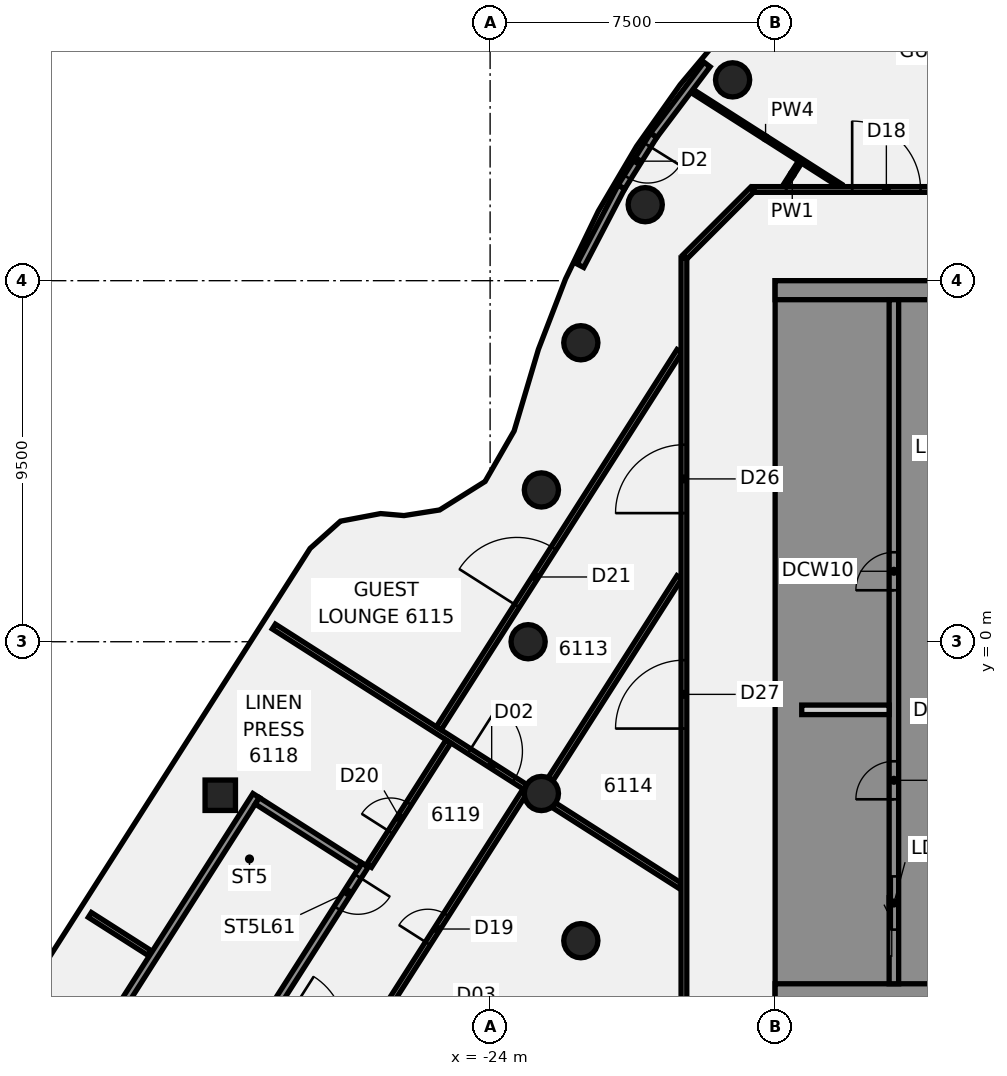
"""IFC4 building model, lengths in metres.
Left out: names, types, materials, properties, quantities, classifications, styles, units other than length and angle.
Written with IfcOpenShell. Run it as: python <this file> out.ifc"""

import sys

from ifc_helpers import new_model, si_unit, direction, frame, frame_2d, origin, origin_2d, place, context, subcontext, project, spatial, polyline, rectangle, circle, outline, extrude, element, fill, save


model = new_model("IFC4")
c1 = context("Model", 3, precision=1e-05, world=origin(), true_north=direction((0.0, 1.0)))
c2 = subcontext(c1, "Body", "Model", "MODEL_VIEW")
j1 = project(units=[si_unit("LENGTHUNIT", "METRE"), si_unit("PLANEANGLEUNIT", "RADIAN")], contexts=[c1])
p1 = place(None, origin())
s1 = spatial("IfcSite", under=j1, at=p1, CompositionType="ELEMENT")
p2 = place(p1, origin())
s2 = spatial("IfcBuilding", under=s1, at=p2, CompositionType="ELEMENT")
p3 = place(p2, frame((0.0, 0.0, 241.5)))
s3 = spatial("IfcBuildingStorey", under=s2, at=p3, CompositionType="ELEMENT", Elevation=241.5)
for number, where, z_axis, x_axis in (
    (1, (-17.619, 14.784, -0.14), (0.0, 0.0, 1.0), (1.0, 0.0, 0.0)),
    (2, (-19.919, 11.5, -0.14), (0.0, 0.0, 1.0), (1.0, 0.0, 0.0)),
    (3, (-21.613, 7.866, -0.14), (0.0, 0.0, 1.0), (1.0, 0.0, 0.0)),
    (4, (-22.651, 3.994, -0.14), (0.0, 0.0, 1.0), (1.0, 0.0, 0.0)),
    (5, (-23.0, 0.0, -0.14), (0.0, 0.0, 1.0), (1.0, 0.0, 0.0)),
    (6, (-22.651, -3.994, -0.14), (0.0, 0.0, 1.0), (1.0, 0.0, 0.0)),
    (7, (-21.613, -7.866, -0.14), (0.0, 0.0, 1.0), (1.0, 0.0, 0.0)),
):
    element("IfcColumn", number, at=place(p3, frame(where, z_axis=z_axis, x_axis=x_axis)), inside=s3, PredefinedType="COLUMN", context=c2, shape_type="SweptSolid", body=[
        extrude(circle(Radius=0.45, at=origin_2d()), origin(), (0.0, 0.0, 1.0), 3.6),
    ])
p4 = place(p3, frame((-31.101, -4.039, -0.139), z_axis=(0.020876035086, -0.045886609589, 0.998728496749), x_axis=(0.538011031714, 0.842490323988, 0.027462405943)))
e8 = element("IfcColumn", 8, at=p4, inside=s3, PredefinedType="COLUMN", context=c2, shape_type="SweptSolid", body=[
    extrude(rectangle(XDim=0.8, YDim=0.8, at=origin_2d()), origin(), (0.0, 0.0, 1.0), 3.602),
])
p5 = place(p3, frame((-34.532, -7.189, 0.0), z_axis=(0.0, 0.0, 1.0), x_axis=(0.84321231402, -0.537580685558, 0.0)))
e9 = element("IfcWall", 9, at=p5, inside=s3, PredefinedType="PARTITIONING", context=c2, shape_type="SweptSolid", body=[
    extrude(rectangle(XDim=1.859, YDim=0.15, at=frame_2d((0.929, 0.0))), origin(), (0.0, 0.0, 1.0), 2.864),
])
p6 = place(p3, frame((-29.691, 0.399, 0.0), z_axis=(0.0, 0.0, 1.0), x_axis=(0.843069969202, -0.537803892724, 0.0)))
e10 = element("IfcWall", 10, at=p6, inside=s3, PredefinedType="PARTITIONING", context=c2, shape_type="SweptSolid", body=[
    extrude(rectangle(XDim=7.858, YDim=0.15, at=frame_2d((3.929, 0.0))), origin(), (0.0, 0.0, 1.0), 2.864),
])
p7 = place(p6, frame((6.099, 0.0, 0.0)))
e11 = element("IfcOpeningElement", 11, at=p7, cuts=e10, PredefinedType="OPENING", context=c2, shape_type="SweptSolid", body=[
    extrude(rectangle(XDim=1.4, YDim=2.1, at=frame_2d((0.7, 1.05))), frame((0.0, 0.085, 0.0), z_axis=(0.0, -1.0, 0.0), x_axis=(1.0, 0.0, 0.0)), (0.0, 0.0, 1.0), 0.17),
])
p8 = place(p3, frame((-22.327, -4.298, 0.0), z_axis=(0.0, 0.0, 1.0), x_axis=(0.843073070403, -0.537799031201, 0.0)))
e12 = element("IfcWall", 12, at=p8, inside=s3, PredefinedType="PARTITIONING", context=c2, shape_type="SweptSolid", body=[
    extrude(rectangle(XDim=3.95, YDim=0.15, at=frame_2d((1.975, 0.0))), origin(), (0.0, 0.0, 1.0), 2.864),
])
p9 = place(p3, frame((-18.724, 14.517, 0.0), z_axis=(0.0, 0.0, 1.0), x_axis=(0.843037970222, -0.537854051546, 0.0)))
e13 = element("IfcWall", 13, at=p9, inside=s3, PredefinedType="PARTITIONING", context=c2, shape_type="SweptSolid", body=[
    extrude(rectangle(XDim=4.68, YDim=0.1, at=frame_2d((2.34, 0.0))), origin(), (0.0, 0.0, 1.0), 2.864),
])
p10 = place(p3, frame((-17.065, 11.9, 0.0), z_axis=(0.0, 0.0, 1.0), x_axis=(1.0, 0.0, 0.0)))
e14 = element("IfcWall", 14, at=p10, inside=s3, PredefinedType="PARTITIONING", context=c2, shape_type="SweptSolid", body=[
    extrude(rectangle(XDim=34.165, YDim=0.15, at=frame_2d((17.083, 0.0))), origin(), (0.0, 0.0, 1.0), 2.864),
])
p11 = place(p10, frame((24.944, 0.0, 0.0)))
e15 = element("IfcOpeningElement", 15, at=p11, cuts=e14, PredefinedType="OPENING", context=c2, shape_type="SweptSolid", body=[
    extrude(rectangle(XDim=1.8, YDim=2.1, at=frame_2d((0.9, 1.05))), frame((0.0, 0.085, 0.0), z_axis=(0.0, -1.0, 0.0), x_axis=(1.0, 0.0, 0.0)), (0.0, 0.0, 1.0), 0.17),
])
p12 = place(p10, frame((9.642, 0.0, 0.0)))
e16 = element("IfcOpeningElement", 16, at=p12, cuts=e14, PredefinedType="OPENING", context=c2, shape_type="SweptSolid", body=[
    extrude(rectangle(XDim=1.8, YDim=2.1, at=frame_2d((0.9, 1.05))), frame((0.0, 0.085, 0.0), z_axis=(0.0, -1.0, 0.0), x_axis=(1.0, 0.0, 0.0)), (0.0, 0.0, 1.0), 0.17),
])
p13 = place(p10, frame((2.592, 0.0, 0.0)))
e17 = element("IfcOpeningElement", 17, at=p13, cuts=e14, PredefinedType="OPENING", context=c2, shape_type="SweptSolid", body=[
    extrude(rectangle(XDim=1.8, YDim=2.1, at=frame_2d((0.9, 1.05))), frame((0.0, 0.085, 0.0), z_axis=(0.0, -1.0, 0.0), x_axis=(1.0, 0.0, 0.0)), (0.0, 0.0, 1.0), 0.17),
])
p14 = place(p3, frame((-18.872, 10.128, 0.0), z_axis=(0.0, 0.0, 1.0), x_axis=(0.707106781187, 0.707106781187, 0.0)))
e18 = element("IfcWall", 18, at=p14, inside=s3, PredefinedType="PARTITIONING", context=c2, shape_type="SweptSolid", body=[
    extrude(rectangle(XDim=2.505, YDim=0.15, at=frame_2d((1.253, 0.0))), origin(), (0.0, 0.0, 1.0), 2.864),
])
p15 = place(p3, frame((-27.83, -11.369, 0.0), z_axis=(0.0, 0.0, 1.0), x_axis=(0.53821322343, 0.842808712654, 0.0)))
e19 = element("IfcWall", 19, at=p15, inside=s3, PredefinedType="PARTITIONING", context=c2, shape_type="SweptSolid", body=[
    extrude(rectangle(XDim=8.781, YDim=0.15, at=frame_2d((4.391, 0.0))), origin(), (0.0, 0.0, 1.0), 2.864),
])
p16 = place(p15, frame((4.07, 0.0, 0.0)))
e20 = element("IfcOpeningElement", 20, at=p16, cuts=e19, PredefinedType="OPENING", context=c2, shape_type="SweptSolid", body=[
    extrude(rectangle(XDim=0.9, YDim=2.1, at=frame_2d((0.45, 1.05))), frame((0.0, 0.085, 0.0), z_axis=(0.0, -1.0, 0.0), x_axis=(1.0, 0.0, 0.0)), (0.0, 0.0, 1.0), 0.17),
])
p17 = place(p3, frame((-27.185, -5.896, 0.0), z_axis=(0.0, 0.0, 1.0), x_axis=(0.537860416346, 0.843033909477, 0.0)))
e21 = element("IfcWall", 21, at=p17, inside=s3, PredefinedType="PARTITIONING", context=c2, shape_type="SweptSolid", body=[
    extrude(rectangle(XDim=3.88, YDim=0.15, at=frame_2d((1.94, 0.0))), origin(), (0.0, 0.0, 1.0), 2.864),
])
p18 = place(p17, frame((1.05, 0.0, 0.0)))
e22 = element("IfcOpeningElement", 22, at=p18, cuts=e21, PredefinedType="OPENING", context=c2, shape_type="SweptSolid", body=[
    extrude(rectangle(XDim=0.9, YDim=2.1, at=frame_2d((0.45, 1.05))), frame((0.0, 0.085, 0.0), z_axis=(0.0, -1.0, 0.0), x_axis=(1.0, 0.0, 0.0)), (0.0, 0.0, 1.0), 0.17),
])
p19 = place(p3, frame((-25.35, -2.276, 0.0), z_axis=(0.0, 0.0, 1.0), x_axis=(0.537870843286, 0.84302725694, 0.0)))
e23 = element("IfcWall", 23, at=p19, inside=s3, PredefinedType="PARTITIONING", context=c2, shape_type="SweptSolid", body=[
    extrude(rectangle(XDim=11.772, YDim=0.15, at=frame_2d((5.886, 0.0))), origin(), (0.0, 0.0, 1.0), 2.864),
])
p20 = place(p19, frame((3.82, 0.0, 0.0)))
e24 = element("IfcOpeningElement", 24, at=p20, cuts=e23, PredefinedType="OPENING", context=c2, shape_type="SweptSolid", body=[
    extrude(rectangle(XDim=1.8, YDim=2.1, at=frame_2d((0.9, 1.05))), frame((0.0, 0.085, 0.0), z_axis=(0.0, -1.0, 0.0), x_axis=(1.0, 0.0, 0.0)), (0.0, 0.0, 1.0), 0.17),
])
p21 = place(p3, frame((-16.252, 11.984, 0.0), z_axis=(0.0, 0.0, 1.0), x_axis=(0.537879071862, 0.843022006861, 0.0)))
e25 = element("IfcWall", 25, at=p21, inside=s3, PredefinedType="PARTITIONING", context=c2, shape_type="SweptSolid", body=[
    extrude(rectangle(XDim=0.755, YDim=0.1, at=frame_2d((0.378, 0.0))), origin(), (0.0, 0.0, 1.0), 2.864),
])
p22 = place(p3, frame((-22.406, -3.611, 0.0), z_axis=(0.0, 0.0, 1.0), x_axis=(0.537858450387, 0.843035163767, 0.0)))
e26 = element("IfcWall", 26, at=p22, inside=s3, PredefinedType="PARTITIONING", context=c2, shape_type="SweptSolid", body=[
    extrude(rectangle(XDim=6.298, YDim=0.15, at=frame_2d((3.149, 0.0))), origin(), (0.0, 0.0, 1.0), 2.864),
])
p23 = place(p3, frame((-18.9, -10.1, 0.0), z_axis=(0.0, 0.0, 1.0), x_axis=(0.0, 1.0, 0.0)))
e27 = element("IfcWall", 27, at=p23, inside=s3, PredefinedType="PARTITIONING", context=c2, shape_type="SweptSolid", body=[
    extrude(rectangle(XDim=20.2, YDim=0.15, at=frame_2d((10.1, 0.0))), origin(), (0.0, 0.0, 1.0), 2.864),
])
p24 = place(p23, frame((13.484, 0.0, 0.0)))
e28 = element("IfcOpeningElement", 28, at=p24, cuts=e27, PredefinedType="OPENING", context=c2, shape_type="SweptSolid", body=[
    extrude(rectangle(XDim=1.8, YDim=2.1, at=frame_2d((0.9, 1.05))), frame((0.0, 0.085, 0.0), z_axis=(0.0, -1.0, 0.0), x_axis=(1.0, 0.0, 0.0)), (0.0, 0.0, 1.0), 0.17),
])
p25 = place(p23, frame((7.815, 0.0, 0.0)))
e29 = element("IfcOpeningElement", 29, at=p25, cuts=e27, PredefinedType="OPENING", context=c2, shape_type="SweptSolid", body=[
    extrude(rectangle(XDim=1.8, YDim=2.1, at=frame_2d((0.9, 1.05))), frame((0.0, 0.085, 0.0), z_axis=(0.0, -1.0, 0.0), x_axis=(1.0, 0.0, 0.0)), (0.0, 0.0, 1.0), 0.17),
])
for number, where, z_axis, x_axis in (
    (30, (-18.292, 15.189, 0.0), (0.0, 0.0, 1.0), (-0.602, -0.799, 0.0)),
    (31, (-20.545, 11.967, 0.0), (0.0, 0.0, 1.0), (-0.462, -0.887, 0.0)),
):
    element("IfcWall", number, at=place(p3, frame(where, z_axis=z_axis, x_axis=x_axis)), inside=s3, PredefinedType="SOLIDWALL", context=c2, shape_type="SweptSolid", body=[
        extrude(rectangle(XDim=2.337, YDim=0.2, at=frame_2d((1.168, 0.0))), origin(), (0.0, 0.0, 1.0), 3.46),
    ])
p26 = place(p3, frame((-19.698, 13.323, 0.0), z_axis=(0.0, 0.0, 1.0), x_axis=(-0.529504774597, -0.848306957226, 0.0)))
e32 = element("IfcWall", 32, at=p26, inside=s3, PredefinedType="SOLIDWALL", context=c2, shape_type="SweptSolid", body=[
    extrude(rectangle(XDim=1.599, YDim=0.2, at=frame_2d((0.8, 0.0))), origin(), (0.0, 0.0, 1.0), 3.46),
])
p27 = place(p26, frame((0.299, 0.0, 0.0)))
e33 = element("IfcOpeningElement", 33, at=p27, cuts=e32, PredefinedType="OPENING", context=c2, shape_type="SweptSolid", body=[
    extrude(rectangle(XDim=1.0, YDim=2.4, at=frame_2d((0.5, 1.2))), frame((0.0, 0.11, 0.0), z_axis=(0.0, -1.0, 0.0), x_axis=(1.0, 0.0, 0.0)), (0.0, 0.0, 1.0), 0.22),
])
p28 = place(p3, frame((-16.5, -9.25, 0.0), z_axis=(0.0, 0.0, 1.0), x_axis=(1.0, 0.0, 0.0)))
e34 = element("IfcWall", 34, at=p28, inside=s3, PredefinedType="SHEAR", context=c2, shape_type="SweptSolid", body=[
    extrude(rectangle(XDim=13.0, YDim=0.5, at=frame_2d((6.5, 0.0))), origin(), (0.0, 0.0, 1.0), 3.46),
])
p29 = place(p28, frame((4.15, 0.0, 0.0)))
e35 = element("IfcOpeningElement", 35, at=p29, cuts=e34, PredefinedType="OPENING", context=c2, shape_type="SweptSolid", body=[
    extrude(rectangle(XDim=1.4, YDim=2.1, at=frame_2d((0.7, 1.05))), frame((0.0, 0.26, 0.0), z_axis=(0.0, -1.0, 0.0), x_axis=(1.0, 0.0, 0.0)), (0.0, 0.0, 1.0), 0.52),
])
p30 = place(p28, frame((10.125, 0.0, 0.0)))
e36 = element("IfcOpeningElement", 36, at=p30, cuts=e34, PredefinedType="OPENING", context=c2, shape_type="SweptSolid", body=[
    extrude(rectangle(XDim=1.4, YDim=2.1, at=frame_2d((0.7, 1.05))), frame((0.0, 0.26, 0.0), z_axis=(0.0, -1.0, 0.0), x_axis=(1.0, 0.0, 0.0)), (0.0, 0.0, 1.0), 0.52),
])
p31 = place(p3, origin())
e37 = element("IfcWall", 37, at=p31, inside=s3, PredefinedType="SHEAR", context=c2, shape_type="SweptSolid", body=[
    extrude(outline(polyline([(-13.5, -8.125), (-16.0, -8.125), (-16.0, -5.625), (-13.5, -5.625), (-13.5, -5.375), (-16.0, -5.375), (-16.0, 5.375), (-13.5, 5.375), (-13.5, 5.625), (-16.0, 5.625), (-16.0, 8.125), (-13.5, 8.125), (-13.5, 9.0), (-16.0, 9.0), (-16.5, 9.0), (-16.5, -9.0), (-16.0, -9.0), (-13.5, -9.0), (-13.5, -8.125)])), origin(), (0.0, 0.0, 1.0), 3.46),
])
p32 = place(p3, frame((-16.5, 9.25, 0.0), z_axis=(0.0, 0.0, 1.0), x_axis=(1.0, 0.0, 0.0)))
e38 = element("IfcWall", 38, at=p32, inside=s3, PredefinedType="SHEAR", context=c2, shape_type="SweptSolid", body=[
    extrude(rectangle(XDim=13.0, YDim=0.5, at=frame_2d((6.5, 0.0))), origin(), (0.0, 0.0, 1.0), 3.46),
])
p33 = place(p3, frame((-13.375, -9.0, 0.0), z_axis=(0.0, 0.0, 1.0), x_axis=(0.0, 1.0, 0.0)))
e39 = element("IfcWall", 39, at=p33, inside=s3, PredefinedType="SHEAR", context=c2, shape_type="SweptSolid", body=[
    extrude(rectangle(XDim=18.0, YDim=0.25, at=frame_2d((9.0, 0.0))), origin(), (0.0, 0.0, 1.0), 3.46),
])
p34 = place(p33, frame((1.425, 0.0, 0.0)))
e40 = element("IfcOpeningElement", 40, at=p34, cuts=e39, PredefinedType="OPENING", context=c2, shape_type="SweptSolid", body=[
    extrude(rectangle(XDim=1.4, YDim=2.1, at=frame_2d((0.7, 1.05))), frame((0.0, 0.135, 0.0), z_axis=(0.0, -1.0, 0.0), x_axis=(1.0, 0.0, 0.0)), (0.0, 0.0, 1.0), 0.27),
])
p35 = place(p33, frame((4.854, 0.0, 0.0)))
e41 = element("IfcOpeningElement", 41, at=p35, cuts=e39, PredefinedType="OPENING", context=c2, shape_type="SweptSolid", body=[
    extrude(rectangle(XDim=1.0, YDim=2.1, at=frame_2d((0.5, 1.05))), frame((0.0, 0.135, 0.0), z_axis=(0.0, -1.0, 0.0), x_axis=(1.0, 0.0, 0.0)), (0.0, 0.0, 1.0), 0.27),
])
p36 = place(p33, frame((10.354, 0.0, 0.0)))
e42 = element("IfcOpeningElement", 42, at=p36, cuts=e39, PredefinedType="OPENING", context=c2, shape_type="SweptSolid", body=[
    extrude(rectangle(XDim=1.0, YDim=2.1, at=frame_2d((0.5, 1.05))), frame((0.0, 0.135, 0.0), z_axis=(0.0, -1.0, 0.0), x_axis=(1.0, 0.0, 0.0)), (0.0, 0.0, 1.0), 0.27),
])
p37 = place(p3, frame((-15.8, -1.792, 0.0), z_axis=(0.0, 0.0, 1.0), x_axis=(1.0, 0.0, 0.0)))
e43 = element("IfcWall", 43, at=p37, inside=s3, PredefinedType="PARTITIONING", context=c2, shape_type="SweptSolid", body=[
    extrude(rectangle(XDim=2.3, YDim=0.25, at=frame_2d((1.15, 0.0))), origin(), (0.0, 0.0, 1.0), 3.46),
])
p38 = place(p3, frame((-27.291, -5.877, -0.14), z_axis=(0.0, 0.0, 1.0), x_axis=(-0.537837128286, -0.843048766939, 0.0)))
e44 = element("IfcWall", 44, at=p38, inside=s3, PredefinedType="SHEAR", context=c2, shape_type="SweptSolid", body=[
    extrude(rectangle(XDim=6.7, YDim=0.2, at=frame_2d((3.35, 0.0))), origin(), (0.0, 0.0, 1.0), 3.004),
])
p39 = place(p38, frame((0.35, 0.0, 0.0)))
e45 = element("IfcOpeningElement", 45, at=p39, cuts=e44, PredefinedType="OPENING", context=c2, shape_type="SweptSolid", body=[
    extrude(rectangle(XDim=1.0, YDim=2.1, at=frame_2d((0.5, 1.05))), frame((0.0, 0.11, 0.0), z_axis=(0.0, -1.0, 0.0), x_axis=(1.0, 0.0, 0.0)), (0.0, 0.0, 1.0), 0.22),
])
p40 = place(p3, frame((-30.157, -4.048, -0.14), z_axis=(0.0, 0.0, 1.0), x_axis=(-0.537837128286, -0.843048766939, 0.0)))
e46 = element("IfcWall", 46, at=p40, inside=s3, PredefinedType="SHEAR", context=c2, shape_type="SweptSolid", body=[
    extrude(rectangle(XDim=6.7, YDim=0.2, at=frame_2d((3.35, 0.0))), origin(), (0.0, 0.0, 1.0), 3.004),
])
p41 = place(p3, frame((-30.127, -4.186, -0.14), z_axis=(0.0, 0.0, 1.0), x_axis=(0.843032618473, -0.53786243984, 0.0)))
e47 = element("IfcWall", 47, at=p41, inside=s3, PredefinedType="SHEAR", context=c2, shape_type="SweptSolid", body=[
    extrude(rectangle(XDim=3.2, YDim=0.2, at=frame_2d((1.6, 0.0))), origin(), (0.0, 0.0, 1.0), 3.004),
])
p42 = place(p7, origin())
e48 = element("IfcDoor", 48, at=p42, inside=s3, OperationType="DOUBLE_DOOR_SINGLE_SWING", PredefinedType="DOOR", context=c2, shape_type="SweptSolid", body=[
    extrude(rectangle(XDim=1.4, YDim=2.1, at=frame_2d((0.7, 1.05))), frame((0.0, 0.025, 0.0), z_axis=(0.0, -1.0, 0.0), x_axis=(1.0, 0.0, 0.0)), (0.0, 0.0, 1.0), 0.05),
])
fill(e11, e48)
p43 = place(p13, origin())
e49 = element("IfcDoor", 49, at=p43, inside=s3, OperationType="DOUBLE_DOOR_SINGLE_SWING", PredefinedType="DOOR", context=c2, shape_type="SweptSolid", body=[
    extrude(rectangle(XDim=1.8, YDim=2.1, at=frame_2d((0.9, 1.05))), frame((0.0, 0.025, 0.0), z_axis=(0.0, -1.0, 0.0), x_axis=(1.0, 0.0, 0.0)), (0.0, 0.0, 1.0), 0.05),
])
fill(e17, e49)
p44 = place(p16, frame((0.9, 0.0, 0.0), z_axis=(0.0, 0.0, 1.0), x_axis=(-1.0, 0.0, 0.0)))
e50 = element("IfcDoor", 50, at=p44, inside=s3, OperationType="SINGLE_SWING_RIGHT", PredefinedType="DOOR", context=c2, shape_type="SweptSolid", body=[
    extrude(rectangle(XDim=0.9, YDim=2.1, at=frame_2d((0.45, 1.05))), frame((0.0, 0.025, 0.0), z_axis=(0.0, -1.0, 0.0), x_axis=(1.0, 0.0, 0.0)), (0.0, 0.0, 1.0), 0.05),
])
fill(e20, e50)
p45 = place(p18, origin())
e51 = element("IfcDoor", 51, at=p45, inside=s3, OperationType="SINGLE_SWING_RIGHT", PredefinedType="DOOR", context=c2, shape_type="SweptSolid", body=[
    extrude(rectangle(XDim=0.9, YDim=2.1, at=frame_2d((0.45, 1.05))), frame((0.0, 0.025, 0.0), z_axis=(0.0, -1.0, 0.0), x_axis=(1.0, 0.0, 0.0)), (0.0, 0.0, 1.0), 0.05),
])
fill(e22, e51)
p46 = place(p20, origin())
e52 = element("IfcDoor", 52, at=p46, inside=s3, OperationType="DOUBLE_DOOR_SINGLE_SWING", PredefinedType="DOOR", context=c2, shape_type="SweptSolid", body=[
    extrude(rectangle(XDim=1.8, YDim=2.1, at=frame_2d((0.9, 1.05))), frame((0.0, 0.025, 0.0), z_axis=(0.0, -1.0, 0.0), x_axis=(1.0, 0.0, 0.0)), (0.0, 0.0, 1.0), 0.05),
])
fill(e24, e52)
p47 = place(p24, frame((1.8, 0.0, 0.0), z_axis=(0.0, 0.0, 1.0), x_axis=(-1.0, 0.0, 0.0)))
e53 = element("IfcDoor", 53, at=p47, inside=s3, OperationType="DOUBLE_DOOR_SINGLE_SWING", PredefinedType="DOOR", context=c2, shape_type="SweptSolid", body=[
    extrude(rectangle(XDim=1.8, YDim=2.1, at=frame_2d((0.9, 1.05))), frame((0.0, 0.025, 0.0), z_axis=(0.0, -1.0, 0.0), x_axis=(1.0, 0.0, 0.0)), (0.0, 0.0, 1.0), 0.05),
])
fill(e28, e53)
p48 = place(p25, origin())
e54 = element("IfcDoor", 54, at=p48, inside=s3, OperationType="DOUBLE_DOOR_SINGLE_SWING", PredefinedType="DOOR", context=c2, shape_type="SweptSolid", body=[
    extrude(rectangle(XDim=1.8, YDim=2.1, at=frame_2d((0.9, 1.05))), frame((0.0, 0.025, 0.0), z_axis=(0.0, -1.0, 0.0), x_axis=(1.0, 0.0, 0.0)), (0.0, 0.0, 1.0), 0.05),
])
fill(e29, e54)
p49 = place(p27, origin())
e55 = element("IfcDoor", 55, at=p49, inside=s3, OperationType="SINGLE_SWING_LEFT", PredefinedType="DOOR", context=c2, shape_type="SweptSolid", body=[
    extrude(rectangle(XDim=1.0, YDim=2.4, at=frame_2d((0.5, 1.2))), frame((0.0, 0.025, 0.0), z_axis=(0.0, -1.0, 0.0), x_axis=(1.0, 0.0, 0.0)), (0.0, 0.0, 1.0), 0.05),
])
fill(e33, e55)
p50 = place(p34, origin())
e56 = element("IfcDoor", 56, at=p50, inside=s3, OperationType="SLIDING_TO_LEFT", PredefinedType="DOOR", context=c2, shape_type="SweptSolid", body=[
    extrude(rectangle(XDim=1.4, YDim=2.1, at=frame_2d((0.7, 1.05))), frame((0.0, 0.025, 0.0), z_axis=(0.0, -1.0, 0.0), x_axis=(1.0, 0.0, 0.0)), (0.0, 0.0, 1.0), 0.05),
])
fill(e40, e56)
p51 = place(p35, origin())
e57 = element("IfcDoor", 57, at=p51, inside=s3, OperationType="SINGLE_SWING_LEFT", PredefinedType="DOOR", context=c2, shape_type="SweptSolid", body=[
    extrude(rectangle(XDim=1.0, YDim=2.1, at=frame_2d((0.5, 1.05))), frame((0.0, 0.025, 0.0), z_axis=(0.0, -1.0, 0.0), x_axis=(1.0, 0.0, 0.0)), (0.0, 0.0, 1.0), 0.05),
])
fill(e41, e57)
p52 = place(p36, origin())
e58 = element("IfcDoor", 58, at=p52, inside=s3, OperationType="SINGLE_SWING_LEFT", PredefinedType="DOOR", context=c2, shape_type="SweptSolid", body=[
    extrude(rectangle(XDim=1.0, YDim=2.1, at=frame_2d((0.5, 1.05))), frame((0.0, 0.025, 0.0), z_axis=(0.0, -1.0, 0.0), x_axis=(1.0, 0.0, 0.0)), (0.0, 0.0, 1.0), 0.05),
])
fill(e42, e58)
p53 = place(p39, origin())
e59 = element("IfcDoor", 59, at=p53, inside=s3, OperationType="SINGLE_SWING_LEFT", PredefinedType="DOOR", context=c2, shape_type="SweptSolid", body=[
    extrude(rectangle(XDim=1.0, YDim=2.1, at=frame_2d((0.5, 1.05))), frame((0.0, 0.025, 0.0), z_axis=(0.0, -1.0, 0.0), x_axis=(1.0, 0.0, 0.0)), (0.0, 0.0, 1.0), 0.05),
])
fill(e45, e59)
save(model, sys.argv[1])
